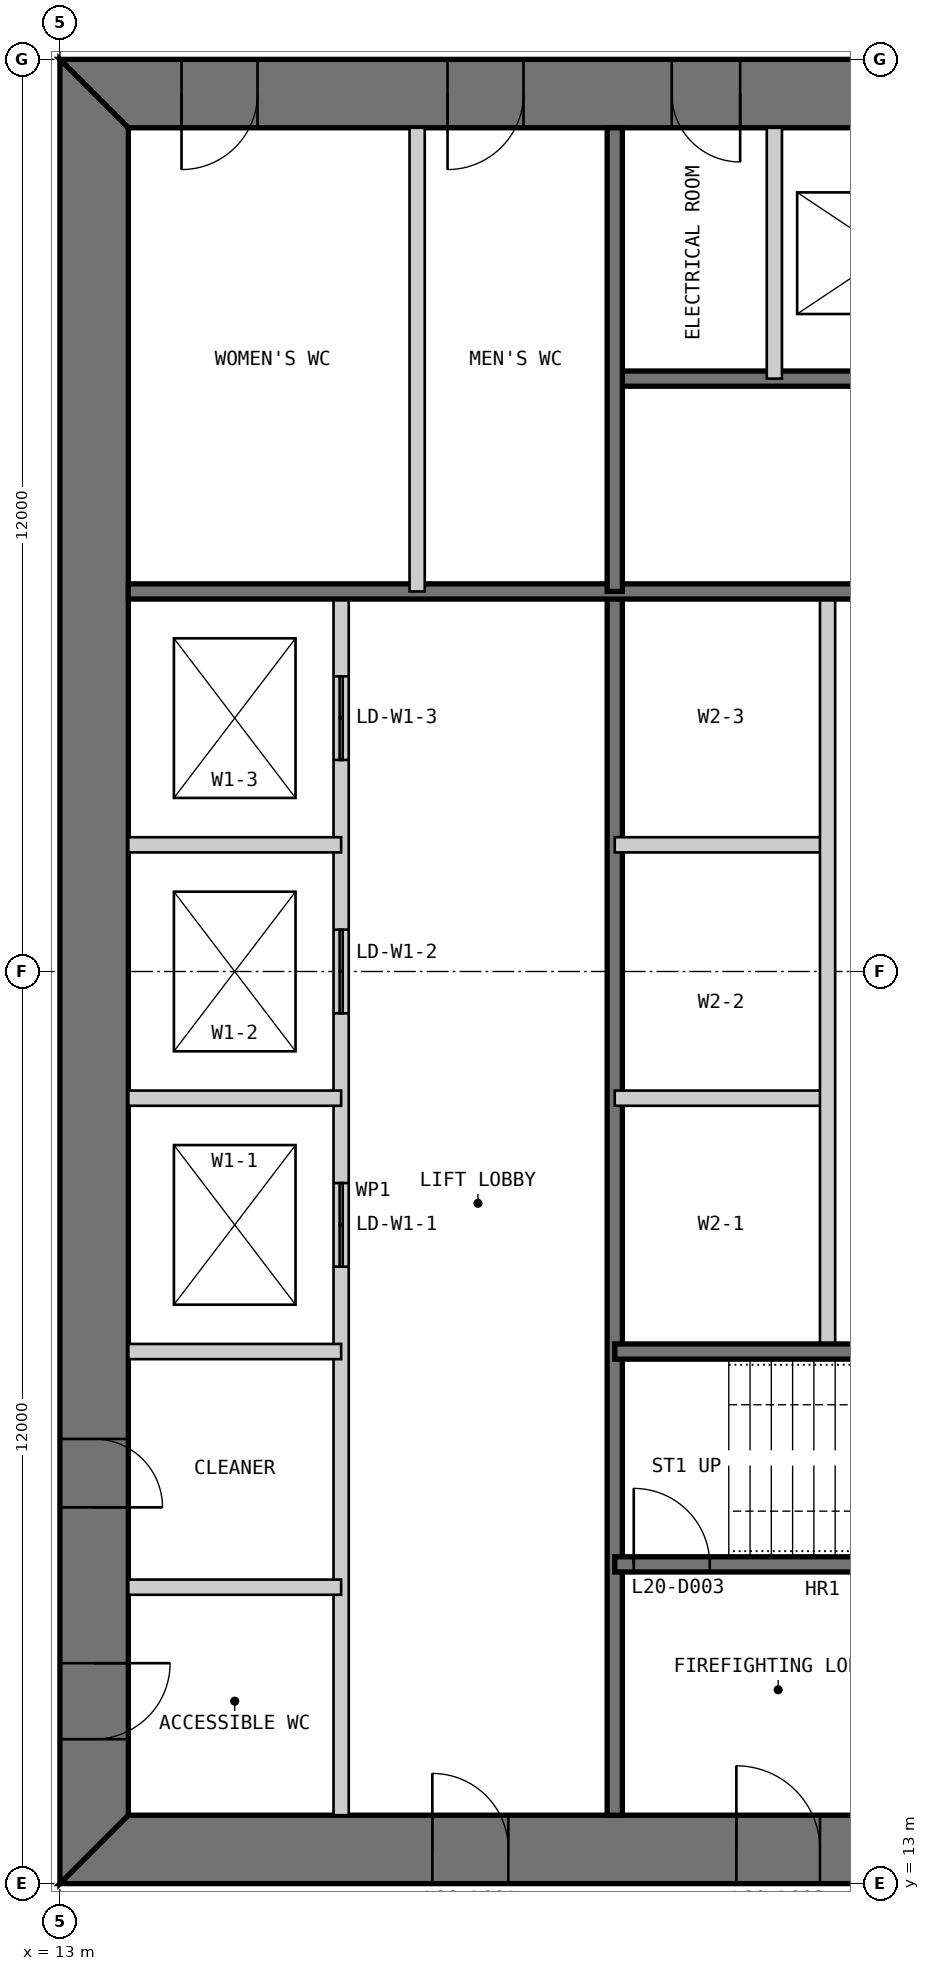
"""IFC4 building model, lengths in metres.
Left out: names, types, materials, properties, quantities, classifications, styles, units other than length and angle.
Written with IfcOpenShell. Run it as: python <this file> out.ifc"""

import sys

from ifc_helpers import new_model, si_unit, direction, frame, frame_2d, origin, place, context, subcontext, project, spatial, polyline, rectangle, outline, extrude, element, fill, save


model = new_model("IFC4")
c1 = context("Model", 3, precision=1e-05, world=origin(), true_north=direction((0.0, 1.0)))
c2 = subcontext(c1, "Body", "Model", "MODEL_VIEW")
j1 = project(units=[si_unit("LENGTHUNIT", "METRE"), si_unit("PLANEANGLEUNIT", "RADIAN")], contexts=[c1])
p1 = place(None, origin())
s1 = spatial("IfcSite", under=j1, at=p1, CompositionType="ELEMENT")
p2 = place(p1, origin())
s2 = spatial("IfcBuilding", under=s1, at=p2, CompositionType="ELEMENT")
p3 = place(p2, frame((0.0, 0.0, 87.0)))
s3 = spatial("IfcBuildingStorey", under=s2, at=p3, CompositionType="ELEMENT", Elevation=87.0)
p4 = place(p3, frame((13.0, 13.45, 0.0), z_axis=(0.0, 0.0, 1.0), x_axis=(1.0, 0.0, 0.0)))
e1 = element("IfcWall", 1, at=p4, inside=s3, PredefinedType="SHEAR", context=c2, shape_type="SweptSolid", body=[
    extrude(outline(polyline([(0.0, -0.45), (24.0, -0.45), (23.1, 0.45), (0.9, 0.45), (0.0, -0.45)])), origin(), (0.0, 0.0, 1.0), 4.0),
])
p5 = place(p4, frame((4.9, 0.0, 0.0)))
e2 = element("IfcOpeningElement", 2, at=p5, cuts=e1, PredefinedType="OPENING", context=c2, shape_type="SweptSolid", body=[
    extrude(rectangle(XDim=1.0, YDim=2.2, at=frame_2d((0.5, 1.1))), frame((0.0, 0.46, 0.0), z_axis=(0.0, -1.0, 0.0), x_axis=(1.0, 0.0, 0.0)), (0.0, 0.0, 1.0), 0.92),
])
p6 = place(p4, frame((8.9, 0.0, 0.0)))
e3 = element("IfcOpeningElement", 3, at=p6, cuts=e1, PredefinedType="OPENING", context=c2, shape_type="SweptSolid", body=[
    extrude(rectangle(XDim=1.1, YDim=2.2, at=frame_2d((0.55, 1.1))), frame((0.0, 0.46, 0.0), z_axis=(0.0, -1.0, 0.0), x_axis=(1.0, 0.0, 0.0)), (0.0, 0.0, 1.0), 0.92),
])
p7 = place(p4, frame((15.05, 0.0, 0.0)))
e4 = element("IfcOpeningElement", 4, at=p7, cuts=e1, PredefinedType="OPENING", context=c2, shape_type="SweptSolid", body=[
    extrude(rectangle(XDim=0.9, YDim=2.2, at=frame_2d((0.45, 1.1))), frame((0.0, 0.46, 0.0), z_axis=(0.0, -1.0, 0.0), x_axis=(1.0, 0.0, 0.0)), (0.0, 0.0, 1.0), 0.92),
])
p8 = place(p4, frame((17.9, 0.0, 0.0)))
e5 = element("IfcOpeningElement", 5, at=p8, cuts=e1, PredefinedType="OPENING", context=c2, shape_type="SweptSolid", body=[
    extrude(rectangle(XDim=1.0, YDim=2.2, at=frame_2d((0.5, 1.1))), frame((0.0, 0.46, 0.0), z_axis=(0.0, -1.0, 0.0), x_axis=(1.0, 0.0, 0.0)), (0.0, 0.0, 1.0), 0.92),
])
p9 = place(p4, frame((21.4, 0.0, 0.0)))
e6 = element("IfcOpeningElement", 6, at=p9, cuts=e1, PredefinedType="OPENING", context=c2, shape_type="SweptSolid", body=[
    extrude(rectangle(XDim=1.0, YDim=2.2, at=frame_2d((0.5, 1.1))), frame((0.0, 0.46, 0.0), z_axis=(0.0, -1.0, 0.0), x_axis=(1.0, 0.0, 0.0)), (0.0, 0.0, 1.0), 0.92),
])
p10 = place(p3, frame((37.0, 36.55, 0.0), z_axis=(0.0, 0.0, 1.0), x_axis=(-1.0, 0.0, 0.0)))
e7 = element("IfcWall", 7, at=p10, inside=s3, PredefinedType="SHEAR", context=c2, shape_type="SweptSolid", body=[
    extrude(outline(polyline([(0.0, -0.45), (24.0, -0.45), (23.1, 0.45), (0.9, 0.45), (0.0, -0.45)])), origin(), (0.0, 0.0, 1.0), 4.0),
])
p11 = place(p10, frame((4.9, 0.0, 0.0)))
e8 = element("IfcOpeningElement", 8, at=p11, cuts=e7, PredefinedType="OPENING", context=c2, shape_type="SweptSolid", body=[
    extrude(rectangle(XDim=1.0, YDim=2.2, at=frame_2d((0.5, 1.1))), frame((0.0, 0.46, 0.0), z_axis=(0.0, -1.0, 0.0), x_axis=(1.0, 0.0, 0.0)), (0.0, 0.0, 1.0), 0.92),
])
p12 = place(p10, frame((8.9, 0.0, 0.0)))
e9 = element("IfcOpeningElement", 9, at=p12, cuts=e7, PredefinedType="OPENING", context=c2, shape_type="SweptSolid", body=[
    extrude(rectangle(XDim=1.1, YDim=2.2, at=frame_2d((0.55, 1.1))), frame((0.0, 0.46, 0.0), z_axis=(0.0, -1.0, 0.0), x_axis=(1.0, 0.0, 0.0)), (0.0, 0.0, 1.0), 0.92),
])
p13 = place(p10, frame((15.05, 0.0, 0.0)))
e10 = element("IfcOpeningElement", 10, at=p13, cuts=e7, PredefinedType="OPENING", context=c2, shape_type="SweptSolid", body=[
    extrude(rectangle(XDim=0.9, YDim=2.2, at=frame_2d((0.45, 1.1))), frame((0.0, 0.46, 0.0), z_axis=(0.0, -1.0, 0.0), x_axis=(1.0, 0.0, 0.0)), (0.0, 0.0, 1.0), 0.92),
])
p14 = place(p10, frame((17.9, 0.0, 0.0)))
e11 = element("IfcOpeningElement", 11, at=p14, cuts=e7, PredefinedType="OPENING", context=c2, shape_type="SweptSolid", body=[
    extrude(rectangle(XDim=1.0, YDim=2.2, at=frame_2d((0.5, 1.1))), frame((0.0, 0.46, 0.0), z_axis=(0.0, -1.0, 0.0), x_axis=(1.0, 0.0, 0.0)), (0.0, 0.0, 1.0), 0.92),
])
p15 = place(p10, frame((21.4, 0.0, 0.0)))
e12 = element("IfcOpeningElement", 12, at=p15, cuts=e7, PredefinedType="OPENING", context=c2, shape_type="SweptSolid", body=[
    extrude(rectangle(XDim=1.0, YDim=2.2, at=frame_2d((0.5, 1.1))), frame((0.0, 0.46, 0.0), z_axis=(0.0, -1.0, 0.0), x_axis=(1.0, 0.0, 0.0)), (0.0, 0.0, 1.0), 0.92),
])
p16 = place(p3, frame((13.45, 36.1, 0.0), z_axis=(0.0, 0.0, 1.0), x_axis=(0.0, -1.0, 0.0)))
e13 = element("IfcWall", 13, at=p16, inside=s3, PredefinedType="SHEAR", context=c2, shape_type="SweptSolid", body=[
    extrude(outline(polyline([(-0.9, -0.45), (23.1, -0.45), (22.2, 0.45), (0.0, 0.45), (-0.9, -0.45)])), origin(), (0.0, 0.0, 1.0), 4.0),
])
p17 = place(p16, frame((20.2, 0.0, 0.0)))
e14 = element("IfcOpeningElement", 14, at=p17, cuts=e13, PredefinedType="OPENING", context=c2, shape_type="SweptSolid", body=[
    extrude(rectangle(XDim=1.0, YDim=2.2, at=frame_2d((0.5, 1.1))), frame((0.0, 0.46, 0.0), z_axis=(0.0, -1.0, 0.0), x_axis=(1.0, 0.0, 0.0)), (0.0, 0.0, 1.0), 0.92),
])
p18 = place(p16, frame((17.25, 0.0, 0.0)))
e15 = element("IfcOpeningElement", 15, at=p18, cuts=e13, PredefinedType="OPENING", context=c2, shape_type="SweptSolid", body=[
    extrude(rectangle(XDim=0.9, YDim=2.2, at=frame_2d((0.45, 1.1))), frame((0.0, 0.46, 0.0), z_axis=(0.0, -1.0, 0.0), x_axis=(1.0, 0.0, 0.0)), (0.0, 0.0, 1.0), 0.92),
])
p19 = place(p3, frame((16.7, 13.9, 0.0), z_axis=(0.0, 0.0, 1.0), x_axis=(0.0, 1.0, 0.0)))
e16 = element("IfcWall", 16, at=p19, inside=s3, PredefinedType="PARTITIONING", context=c2, shape_type="SweptSolid", body=[
    extrude(rectangle(XDim=16.1, YDim=0.2, at=frame_2d((8.05, 0.0))), origin(), (0.0, 0.0, 1.0), 3.8),
])
p20 = place(p19, frame((7.217, 0.0, 0.0)))
e17 = element("IfcOpeningElement", 17, at=p20, cuts=e16, PredefinedType="OPENING", context=c2, shape_type="SweptSolid", body=[
    extrude(rectangle(XDim=1.1, YDim=2.2, at=frame_2d((0.55, 1.1))), frame((0.0, 0.11, 0.0), z_axis=(0.0, -1.0, 0.0), x_axis=(1.0, 0.0, 0.0)), (0.0, 0.0, 1.0), 0.22),
])
p21 = place(p19, frame((10.55, 0.0, 0.0)))
e18 = element("IfcOpeningElement", 18, at=p21, cuts=e16, PredefinedType="OPENING", context=c2, shape_type="SweptSolid", body=[
    extrude(rectangle(XDim=1.1, YDim=2.2, at=frame_2d((0.55, 1.1))), frame((0.0, 0.11, 0.0), z_axis=(0.0, -1.0, 0.0), x_axis=(1.0, 0.0, 0.0)), (0.0, 0.0, 1.0), 0.22),
])
p22 = place(p19, frame((13.883, 0.0, 0.0)))
e19 = element("IfcOpeningElement", 19, at=p22, cuts=e16, PredefinedType="OPENING", context=c2, shape_type="SweptSolid", body=[
    extrude(rectangle(XDim=1.1, YDim=2.2, at=frame_2d((0.55, 1.1))), frame((0.0, 0.11, 0.0), z_axis=(0.0, -1.0, 0.0), x_axis=(1.0, 0.0, 0.0)), (0.0, 0.0, 1.0), 0.22),
])
p23 = place(p3, frame((20.3, 13.9, 0.0), z_axis=(0.0, 0.0, 1.0), x_axis=(0.0, 1.0, 0.0)))
e20 = element("IfcWall", 20, at=p23, inside=s3, PredefinedType="SOLIDWALL", context=c2, shape_type="SweptSolid", body=[
    extrude(rectangle(XDim=16.1, YDim=0.2, at=frame_2d((8.05, 0.0))), origin(), (0.0, 0.0, 1.0), 3.8),
])
for number, where, z_axis, x_axis in (
    (21, (13.9, 20.0, 0.0), (0.0, 0.0, 1.0), (1.0, 0.0, 0.0)),
    (22, (13.9, 23.333, 0.0), (0.0, 0.0, 1.0), (1.0, 0.0, 0.0)),
    (23, (13.9, 26.667, 0.0), (0.0, 0.0, 1.0), (1.0, 0.0, 0.0)),
    (24, (20.3, 23.333, 0.0), (0.0, 0.0, 1.0), (1.0, 0.0, 0.0)),
    (25, (20.3, 26.667, 0.0), (0.0, 0.0, 1.0), (1.0, 0.0, 0.0)),
):
    element("IfcWall", number, at=place(p3, frame(where, z_axis=z_axis, x_axis=x_axis)), inside=s3, PredefinedType="PARTITIONING", context=c2, shape_type="SweptSolid", body=[
        extrude(rectangle(XDim=2.8, YDim=0.2, at=frame_2d((1.4, 0.0))), origin(), (0.0, 0.0, 1.0), 3.8),
    ])
p24 = place(p3, frame((23.1, 20.0, 0.0), z_axis=(0.0, 0.0, 1.0), x_axis=(0.0, 1.0, 0.0)))
e26 = element("IfcWall", 26, at=p24, inside=s3, PredefinedType="PARTITIONING", context=c2, shape_type="SweptSolid", body=[
    extrude(rectangle(XDim=10.0, YDim=0.2, at=frame_2d((5.0, 0.0))), origin(), (0.0, 0.0, 1.0), 3.8),
])
p25 = place(p3, frame((20.3, 17.2, 0.0), z_axis=(0.0, 0.0, 1.0), x_axis=(1.0, 0.0, 0.0)))
e27 = element("IfcWall", 27, at=p25, inside=s3, PredefinedType="SOLIDWALL", context=c2, shape_type="SweptSolid", body=[
    extrude(rectangle(XDim=9.4, YDim=0.2, at=frame_2d((4.7, 0.0))), origin(), (0.0, 0.0, 1.0), 3.8),
])
p26 = place(p25, frame((0.25, 0.0, 0.0)))
e28 = element("IfcOpeningElement", 28, at=p26, cuts=e27, PredefinedType="OPENING", context=c2, shape_type="SweptSolid", body=[
    extrude(rectangle(XDim=1.0, YDim=2.2, at=frame_2d((0.5, 1.1))), frame((0.0, 0.11, 0.0), z_axis=(0.0, -1.0, 0.0), x_axis=(1.0, 0.0, 0.0)), (0.0, 0.0, 1.0), 0.22),
])
p27 = place(p3, frame((20.3, 20.0, 0.0), z_axis=(0.0, 0.0, 1.0), x_axis=(1.0, 0.0, 0.0)))
e29 = element("IfcWall", 29, at=p27, inside=s3, PredefinedType="SOLIDWALL", context=c2, shape_type="SweptSolid", body=[
    extrude(rectangle(XDim=15.8, YDim=0.2, at=frame_2d((7.9, 0.0))), origin(), (0.0, 0.0, 1.0), 3.8),
])
p28 = place(p3, frame((13.9, 16.9, 0.0), z_axis=(0.0, 0.0, 1.0), x_axis=(1.0, 0.0, 0.0)))
e30 = element("IfcWall", 30, at=p28, inside=s3, PredefinedType="PARTITIONING", context=c2, shape_type="SweptSolid", body=[
    extrude(rectangle(XDim=2.8, YDim=0.2, at=frame_2d((1.4, 0.0))), origin(), (0.0, 0.0, 1.0), 3.8),
])
p29 = place(p3, frame((29.7, 32.8, 0.0), z_axis=(0.0, 0.0, 1.0), x_axis=(-1.0, 0.0, 0.0)))
e31 = element("IfcWall", 31, at=p29, inside=s3, PredefinedType="SOLIDWALL", context=c2, shape_type="SweptSolid", body=[
    extrude(rectangle(XDim=9.4, YDim=0.2, at=frame_2d((4.7, 0.0))), origin(), (0.0, 0.0, 1.0), 3.8),
])
p30 = place(p29, frame((0.25, 0.0, 0.0)))
e32 = element("IfcOpeningElement", 32, at=p30, cuts=e31, PredefinedType="OPENING", context=c2, shape_type="SweptSolid", body=[
    extrude(rectangle(XDim=1.0, YDim=2.2, at=frame_2d((0.5, 1.1))), frame((0.0, 0.11, 0.0), z_axis=(0.0, -1.0, 0.0), x_axis=(1.0, 0.0, 0.0)), (0.0, 0.0, 1.0), 0.22),
])
p31 = place(p3, frame((29.7, 30.0, 0.0), z_axis=(0.0, 0.0, 1.0), x_axis=(-1.0, 0.0, 0.0)))
e33 = element("IfcWall", 33, at=p31, inside=s3, PredefinedType="SOLIDWALL", context=c2, shape_type="SweptSolid", body=[
    extrude(rectangle(XDim=15.8, YDim=0.2, at=frame_2d((7.9, 0.0))), origin(), (0.0, 0.0, 1.0), 3.8),
])
p32 = place(p3, frame((22.4, 36.1, 0.0), z_axis=(0.0, 0.0, 1.0), x_axis=(0.0, -1.0, 0.0)))
e34 = element("IfcWall", 34, at=p32, inside=s3, PredefinedType="PARTITIONING", context=c2, shape_type="SweptSolid", body=[
    extrude(rectangle(XDim=3.3, YDim=0.2, at=frame_2d((1.65, 0.0))), origin(), (0.0, 0.0, 1.0), 3.8),
])
p33 = place(p3, frame((20.3, 36.1, 0.0), z_axis=(0.0, 0.0, 1.0), x_axis=(0.0, -1.0, 0.0)))
e35 = element("IfcWall", 35, at=p33, inside=s3, PredefinedType="SOLIDWALL", context=c2, shape_type="SweptSolid", body=[
    extrude(rectangle(XDim=6.1, YDim=0.2, at=frame_2d((3.05, 0.0))), origin(), (0.0, 0.0, 1.0), 3.8),
])
p34 = place(p3, frame((17.7, 36.1, 0.0), z_axis=(0.0, 0.0, 1.0), x_axis=(0.0, -1.0, 0.0)))
e36 = element("IfcWall", 36, at=p34, inside=s3, PredefinedType="PARTITIONING", context=c2, shape_type="SweptSolid", body=[
    extrude(rectangle(XDim=6.1, YDim=0.2, at=frame_2d((3.05, 0.0))), origin(), (0.0, 0.0, 1.0), 3.8),
])
p35 = place(p5, origin())
e37 = element("IfcDoor", 37, at=p35, inside=s3, OperationType="SINGLE_SWING_LEFT", PredefinedType="DOOR", context=c2, shape_type="SweptSolid", body=[
    extrude(rectangle(XDim=1.0, YDim=2.2, at=frame_2d((0.5, 1.1))), frame((0.0, 0.025, 0.0), z_axis=(0.0, -1.0, 0.0), x_axis=(1.0, 0.0, 0.0)), (0.0, 0.0, 1.0), 0.05),
    extrude(outline(polyline([(0.0, 0.0), (0.04, 0.0), (0.04, 2.16), (0.96, 2.16), (0.96, 0.0), (1.0, 0.0), (1.0, 2.2), (0.0, 2.2), (0.0, 0.0)])), frame((0.0, 0.3, 0.0), z_axis=(0.0, -1.0, 0.0), x_axis=(1.0, 0.0, 0.0)), (0.0, 0.0, 1.0), 0.6),
])
fill(e2, e37)
p36 = place(p6, origin())
e38 = element("IfcDoor", 38, at=p36, inside=s3, OperationType="SINGLE_SWING_LEFT", PredefinedType="DOOR", context=c2, shape_type="SweptSolid", body=[
    extrude(rectangle(XDim=1.1, YDim=2.2, at=frame_2d((0.55, 1.1))), frame((0.0, 0.025, 0.0), z_axis=(0.0, -1.0, 0.0), x_axis=(1.0, 0.0, 0.0)), (0.0, 0.0, 1.0), 0.05),
    extrude(outline(polyline([(0.0, 0.0), (0.04, 0.0), (0.04, 2.16), (1.06, 2.16), (1.06, 0.0), (1.1, 0.0), (1.1, 2.2), (0.0, 2.2), (0.0, 0.0)])), frame((0.0, 0.3, 0.0), z_axis=(0.0, -1.0, 0.0), x_axis=(1.0, 0.0, 0.0)), (0.0, 0.0, 1.0), 0.6),
])
fill(e3, e38)
p37 = place(p26, origin())
e39 = element("IfcDoor", 39, at=p37, inside=s3, OperationType="SINGLE_SWING_LEFT", PredefinedType="DOOR", context=c2, shape_type="SweptSolid", body=[
    extrude(rectangle(XDim=1.0, YDim=2.2, at=frame_2d((0.5, 1.1))), frame((0.0, 0.025, 0.0), z_axis=(0.0, -1.0, 0.0), x_axis=(1.0, 0.0, 0.0)), (0.0, 0.0, 1.0), 0.05),
])
fill(e28, e39)
p38 = place(p17, origin())
e40 = element("IfcDoor", 40, at=p38, inside=s3, OperationType="SINGLE_SWING_LEFT", PredefinedType="DOOR", context=c2, shape_type="SweptSolid", body=[
    extrude(rectangle(XDim=1.0, YDim=2.2, at=frame_2d((0.5, 1.1))), frame((0.0, 0.025, 0.0), z_axis=(0.0, -1.0, 0.0), x_axis=(1.0, 0.0, 0.0)), (0.0, 0.0, 1.0), 0.05),
    extrude(outline(polyline([(0.0, 0.0), (0.04, 0.0), (0.04, 2.16), (0.96, 2.16), (0.96, 0.0), (1.0, 0.0), (1.0, 2.2), (0.0, 2.2), (0.0, 0.0)])), frame((0.0, 0.3, 0.0), z_axis=(0.0, -1.0, 0.0), x_axis=(1.0, 0.0, 0.0)), (0.0, 0.0, 1.0), 0.6),
])
fill(e14, e40)
p39 = place(p18, origin())
e41 = element("IfcDoor", 41, at=p39, inside=s3, OperationType="SINGLE_SWING_RIGHT", PredefinedType="DOOR", context=c2, shape_type="SweptSolid", body=[
    extrude(rectangle(XDim=0.9, YDim=2.2, at=frame_2d((0.45, 1.1))), frame((0.0, 0.025, 0.0), z_axis=(0.0, -1.0, 0.0), x_axis=(1.0, 0.0, 0.0)), (0.0, 0.0, 1.0), 0.05),
    extrude(outline(polyline([(0.0, 0.0), (0.04, 0.0), (0.04, 2.16), (0.86, 2.16), (0.86, 0.0), (0.9, 0.0), (0.9, 2.2), (0.0, 2.2), (0.0, 0.0)])), frame((0.0, 0.3, 0.0), z_axis=(0.0, -1.0, 0.0), x_axis=(1.0, 0.0, 0.0)), (0.0, 0.0, 1.0), 0.6),
])
fill(e15, e41)
p40 = place(p13, origin())
e42 = element("IfcDoor", 42, at=p40, inside=s3, OperationType="SINGLE_SWING_LEFT", PredefinedType="DOOR", context=c2, shape_type="SweptSolid", body=[
    extrude(rectangle(XDim=0.9, YDim=2.2, at=frame_2d((0.45, 1.1))), frame((0.0, 0.025, 0.0), z_axis=(0.0, -1.0, 0.0), x_axis=(1.0, 0.0, 0.0)), (0.0, 0.0, 1.0), 0.05),
    extrude(outline(polyline([(0.0, 0.0), (0.04, 0.0), (0.04, 2.16), (0.86, 2.16), (0.86, 0.0), (0.9, 0.0), (0.9, 2.2), (0.0, 2.2), (0.0, 0.0)])), frame((0.0, 0.3, 0.0), z_axis=(0.0, -1.0, 0.0), x_axis=(1.0, 0.0, 0.0)), (0.0, 0.0, 1.0), 0.6),
])
fill(e10, e42)
p41 = place(p14, origin())
e43 = element("IfcDoor", 43, at=p41, inside=s3, OperationType="SINGLE_SWING_RIGHT", PredefinedType="DOOR", context=c2, shape_type="SweptSolid", body=[
    extrude(rectangle(XDim=1.0, YDim=2.2, at=frame_2d((0.5, 1.1))), frame((0.0, 0.025, 0.0), z_axis=(0.0, -1.0, 0.0), x_axis=(1.0, 0.0, 0.0)), (0.0, 0.0, 1.0), 0.05),
    extrude(outline(polyline([(0.0, 0.0), (0.04, 0.0), (0.04, 2.16), (0.96, 2.16), (0.96, 0.0), (1.0, 0.0), (1.0, 2.2), (0.0, 2.2), (0.0, 0.0)])), frame((0.0, 0.3, 0.0), z_axis=(0.0, -1.0, 0.0), x_axis=(1.0, 0.0, 0.0)), (0.0, 0.0, 1.0), 0.6),
])
fill(e11, e43)
p42 = place(p15, origin())
e44 = element("IfcDoor", 44, at=p42, inside=s3, OperationType="SINGLE_SWING_RIGHT", PredefinedType="DOOR", context=c2, shape_type="SweptSolid", body=[
    extrude(rectangle(XDim=1.0, YDim=2.2, at=frame_2d((0.5, 1.1))), frame((0.0, 0.025, 0.0), z_axis=(0.0, -1.0, 0.0), x_axis=(1.0, 0.0, 0.0)), (0.0, 0.0, 1.0), 0.05),
    extrude(outline(polyline([(0.0, 0.0), (0.04, 0.0), (0.04, 2.16), (0.96, 2.16), (0.96, 0.0), (1.0, 0.0), (1.0, 2.2), (0.0, 2.2), (0.0, 0.0)])), frame((0.0, 0.3, 0.0), z_axis=(0.0, -1.0, 0.0), x_axis=(1.0, 0.0, 0.0)), (0.0, 0.0, 1.0), 0.6),
])
fill(e12, e44)
p43 = place(p20, origin())
e45 = element("IfcDoor", 45, at=p43, inside=s3, OperationType="DOUBLE_DOOR_SLIDING", PredefinedType="DOOR", context=c2, shape_type="SweptSolid", body=[
    extrude(rectangle(XDim=1.1, YDim=2.2, at=frame_2d((0.55, 1.1))), frame((0.0, 0.025, 0.0), z_axis=(0.0, -1.0, 0.0), x_axis=(1.0, 0.0, 0.0)), (0.0, 0.0, 1.0), 0.05),
])
fill(e17, e45)
p44 = place(p21, origin())
e46 = element("IfcDoor", 46, at=p44, inside=s3, OperationType="DOUBLE_DOOR_SLIDING", PredefinedType="DOOR", context=c2, shape_type="SweptSolid", body=[
    extrude(rectangle(XDim=1.1, YDim=2.2, at=frame_2d((0.55, 1.1))), frame((0.0, 0.025, 0.0), z_axis=(0.0, -1.0, 0.0), x_axis=(1.0, 0.0, 0.0)), (0.0, 0.0, 1.0), 0.05),
])
fill(e18, e46)
p45 = place(p22, origin())
e47 = element("IfcDoor", 47, at=p45, inside=s3, OperationType="DOUBLE_DOOR_SLIDING", PredefinedType="DOOR", context=c2, shape_type="SweptSolid", body=[
    extrude(rectangle(XDim=1.1, YDim=2.2, at=frame_2d((0.55, 1.1))), frame((0.0, 0.025, 0.0), z_axis=(0.0, -1.0, 0.0), x_axis=(1.0, 0.0, 0.0)), (0.0, 0.0, 1.0), 0.05),
])
fill(e19, e47)
save(model, sys.argv[1])
